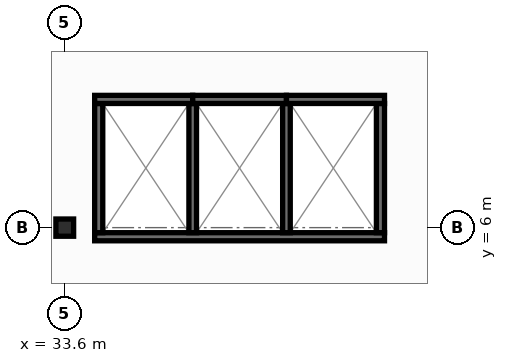
"""IFC4 building model, lengths in metres.
Left out: names, types, materials, properties, quantities, classifications, styles, units other than length and angle.
Written with IfcOpenShell. Run it as: python <this file> out.ifc"""

import sys

from ifc_helpers import new_model, si_unit, direction, frame, frame_2d, origin, origin_2d, place, context, subcontext, project, spatial, rectangle, i_section, extrude, element, save


model = new_model("IFC4")
c1 = context("Model", 3, precision=1e-05, world=origin(), true_north=direction((0.0, 1.0)))
c2 = subcontext(c1, "Body", "Model", "MODEL_VIEW")
j1 = project(units=[si_unit("LENGTHUNIT", "METRE"), si_unit("PLANEANGLEUNIT", "RADIAN")], contexts=[c1])
p1 = place(None, origin())
s1 = spatial("IfcSite", under=j1, at=p1, CompositionType="ELEMENT")
p2 = place(p1, origin())
s2 = spatial("IfcBuilding", under=s1, at=p2, CompositionType="ELEMENT")
p3 = place(p2, frame((0.0, 0.0, 22.5)))
s3 = spatial("IfcBuildingStorey", under=s2, at=p3, CompositionType="ELEMENT", Elevation=22.5)
p4 = place(p3, frame((33.6, 6.0, 0.0), z_axis=(0.0, 0.0, 1.0), x_axis=(1.0, 0.0, 0.0)))
e1 = element("IfcColumn", 1, at=p4, inside=s3, PredefinedType="COLUMN", context=c2, shape_type="SweptSolid", body=[
    extrude(i_section(OverallWidth=0.35, OverallDepth=0.34, WebThickness=0.016, FlangeThickness=0.028, at=origin_2d()), origin(), (0.0, 0.0, 1.0), 3.95),
])
p5 = place(p3, frame((34.19, 5.82, 0.0), z_axis=(0.0, 0.0, 1.0), x_axis=(1.0, 0.0, 0.0)))
e2 = element("IfcWall", 2, at=p5, inside=s3, PredefinedType="SHEAR", context=c2, shape_type="SweptSolid", body=[
    extrude(rectangle(XDim=5.72, YDim=0.16, at=frame_2d((2.86, 0.0))), origin(), (0.0, 0.0, 1.0), 3.71),
])
for number, where, z_axis, x_axis in (
    (3, (34.27, 5.9, 0.0), (0.0, 0.0, 1.0), (0.0, 1.0, 0.0)),
    (4, (39.83, 5.9, 0.0), (0.0, 0.0, 1.0), (0.0, 1.0, 0.0)),
):
    element("IfcWall", number, at=place(p3, frame(where, z_axis=z_axis, x_axis=x_axis)), inside=s3, PredefinedType="SHEAR", context=c2, shape_type="SweptSolid", body=[
        extrude(rectangle(XDim=2.55, YDim=0.16, at=frame_2d((1.275, 0.0))), origin(), (0.0, 0.0, 1.0), 3.71),
    ])
for number, where, z_axis, x_axis in (
    (5, (36.125, 5.9, 0.0), (0.0, 0.0, 1.0), (0.0, 1.0, 0.0)),
    (6, (37.975, 5.9, 0.0), (0.0, 0.0, 1.0), (0.0, 1.0, 0.0)),
):
    element("IfcWall", number, at=place(p3, frame(where, z_axis=z_axis, x_axis=x_axis)), inside=s3, PredefinedType="SHEAR", context=c2, shape_type="SweptSolid", body=[
        extrude(rectangle(XDim=2.55, YDim=0.15, at=frame_2d((1.275, 0.0))), origin(), (0.0, 0.0, 1.0), 3.71),
    ])
p6 = place(p3, frame((34.19, 8.53, 0.0), z_axis=(0.0, 0.0, 1.0), x_axis=(1.0, 0.0, 0.0)))
e7 = element("IfcWall", 7, at=p6, inside=s3, PredefinedType="SHEAR", context=c2, shape_type="SweptSolid", body=[
    extrude(rectangle(XDim=1.935, YDim=0.16, at=frame_2d((0.968, 0.0))), origin(), (0.0, 0.0, 1.0), 3.71),
])
p7 = place(p3, frame((36.125, 8.53, 0.0), z_axis=(0.0, 0.0, 1.0), x_axis=(1.0, 0.0, 0.0)))
e8 = element("IfcWall", 8, at=p7, inside=s3, PredefinedType="SHEAR", context=c2, shape_type="SweptSolid", body=[
    extrude(rectangle(XDim=1.85, YDim=0.16, at=frame_2d((0.925, 0.0))), origin(), (0.0, 0.0, 1.0), 3.71),
])
p8 = place(p3, frame((37.975, 8.53, 0.0), z_axis=(0.0, 0.0, 1.0), x_axis=(1.0, 0.0, 0.0)))
e9 = element("IfcWall", 9, at=p8, inside=s3, PredefinedType="SHEAR", context=c2, shape_type="SweptSolid", body=[
    extrude(rectangle(XDim=1.935, YDim=0.16, at=frame_2d((0.967, 0.0))), origin(), (0.0, 0.0, 1.0), 3.71),
])
save(model, sys.argv[1])
